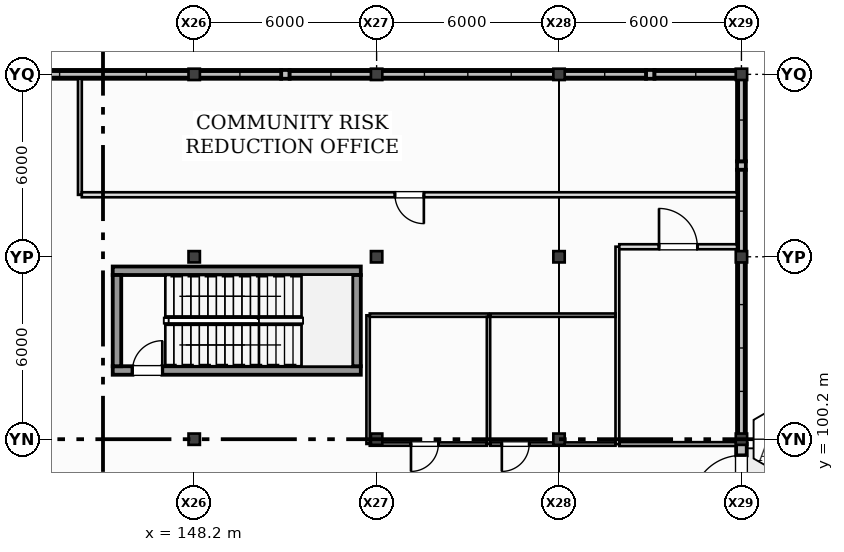
"""IFC4 building model, lengths in metres.
Left out: names, types, materials, properties, quantities, classifications, styles, units other than length and angle.
Written with IfcOpenShell. Run it as: python <this file> out.ifc"""

import sys

from ifc_helpers import new_model, si_unit, direction, frame, frame_2d, origin, origin_2d, place, context, subcontext, project, spatial, rectangle, i_section, extrude, element, fill, save


model = new_model("IFC4")
c1 = context("Model", 3, precision=1e-05, world=origin(), true_north=direction((0.0, 1.0)))
c2 = subcontext(c1, "Body", "Model", "MODEL_VIEW")
j1 = project(units=[si_unit("LENGTHUNIT", "METRE"), si_unit("PLANEANGLEUNIT", "RADIAN")], contexts=[c1])
p1 = place(None, origin())
s1 = spatial("IfcSite", under=j1, at=p1, CompositionType="ELEMENT")
p2 = place(p1, origin())
s2 = spatial("IfcBuilding", under=s1, at=p2, CompositionType="ELEMENT")
p3 = place(p2, origin())
s3 = spatial("IfcBuildingStorey", under=s2, at=p3, CompositionType="ELEMENT", Elevation=0.0)
for number, where, z_axis, x_axis in (
    (1, (148.2, 100.2, 0.0), (0.0, 0.0, 1.0), (1.0, 0.0, 0.0)),
    (2, (148.2, 106.2, 0.0), (0.0, 0.0, 1.0), (1.0, 0.0, 0.0)),
    (3, (148.2, 112.2, 0.0), (0.0, 0.0, 1.0), (1.0, 0.0, 0.0)),
    (4, (154.2, 100.2, 0.0), (0.0, 0.0, 1.0), (1.0, 0.0, 0.0)),
    (5, (154.2, 106.2, 0.0), (0.0, 0.0, 1.0), (1.0, 0.0, 0.0)),
    (6, (154.2, 112.2, 0.0), (0.0, 0.0, 1.0), (1.0, 0.0, 0.0)),
    (7, (160.2, 100.2, 0.0), (0.0, 0.0, 1.0), (1.0, 0.0, 0.0)),
    (8, (160.2, 106.2, 0.0), (0.0, 0.0, 1.0), (1.0, 0.0, 0.0)),
    (9, (160.2, 112.2, 0.0), (0.0, 0.0, 1.0), (1.0, 0.0, 0.0)),
    (10, (166.2, 100.2, 0.0), (0.0, 0.0, 1.0), (1.0, 0.0, 0.0)),
    (11, (166.2, 106.2, 0.0), (0.0, 0.0, 1.0), (1.0, 0.0, 0.0)),
    (12, (166.2, 112.2, 0.0), (0.0, 0.0, 1.0), (1.0, 0.0, 0.0)),
):
    element("IfcColumn", number, at=place(p3, frame(where, z_axis=z_axis, x_axis=x_axis)), inside=s3, PredefinedType="COLUMN", context=c2, shape_type="SweptSolid", body=[
        extrude(i_section(OverallWidth=0.374, OverallDepth=0.372, WebThickness=0.016, FlangeThickness=0.026, at=origin_2d()), origin(), (0.0, 0.0, 1.0), 6.0),
    ])
p4 = place(p3, frame((148.055, 112.2, 0.0), z_axis=(0.0, 0.0, 1.0), x_axis=(-1.0, 0.0, 0.0)))
e13 = element("IfcWall", 13, at=p4, inside=s3, PredefinedType="STANDARD", context=c2, shape_type="SweptSolid", body=[
    extrude(rectangle(XDim=5.71, YDim=0.29, at=frame_2d((2.855, 0.0))), origin(), (0.0, 0.0, 1.0), 0.56),
])
p5 = place(p3, frame((151.34, 112.2, 0.0), z_axis=(0.0, 0.0, 1.0), x_axis=(-1.0, 0.0, 0.0)))
e14 = element("IfcWall", 14, at=p5, inside=s3, PredefinedType="STANDARD", context=c2, shape_type="SweptSolid", body=[
    extrude(rectangle(XDim=0.28, YDim=0.29, at=frame_2d((0.14, 0.0))), origin(), (0.0, 0.0, 1.0), 5.113),
])
p6 = place(p3, frame((154.055, 112.2, 0.0), z_axis=(0.0, 0.0, 1.0), x_axis=(-1.0, 0.0, 0.0)))
e15 = element("IfcWall", 15, at=p6, inside=s3, PredefinedType="STANDARD", context=c2, shape_type="SweptSolid", body=[
    extrude(rectangle(XDim=2.715, YDim=0.29, at=frame_2d((1.357, 0.0))), origin(), (0.0, 0.0, 1.0), 0.68),
])
p7 = place(p3, frame((151.06, 112.2, 0.0), z_axis=(0.0, 0.0, 1.0), x_axis=(-1.0, 0.0, 0.0)))
e16 = element("IfcWall", 16, at=p7, inside=s3, PredefinedType="STANDARD", context=c2, shape_type="SweptSolid", body=[
    extrude(rectangle(XDim=2.715, YDim=0.29, at=frame_2d((1.357, 0.0))), origin(), (0.0, 0.0, 1.0), 0.8),
])
p8 = place(p3, frame((160.055, 112.2, 0.0), z_axis=(0.0, 0.0, 1.0), x_axis=(-1.0, 0.0, 0.0)))
e17 = element("IfcWall", 17, at=p8, inside=s3, PredefinedType="STANDARD", context=c2, shape_type="SweptSolid", body=[
    extrude(rectangle(XDim=5.71, YDim=0.29, at=frame_2d((2.855, 0.0))), origin(), (0.0, 0.0, 1.0), 0.92),
])
p9 = place(p3, frame((163.34, 112.2, 0.0), z_axis=(0.0, 0.0, 1.0), x_axis=(-1.0, 0.0, 0.0)))
e18 = element("IfcWall", 18, at=p9, inside=s3, PredefinedType="STANDARD", context=c2, shape_type="SweptSolid", body=[
    extrude(rectangle(XDim=0.28, YDim=0.29, at=frame_2d((0.14, 0.0))), origin(), (0.0, 0.0, 1.0), 5.113),
])
p10 = place(p3, frame((166.055, 112.2, 0.0), z_axis=(0.0, 0.0, 1.0), x_axis=(-1.0, 0.0, 0.0)))
e19 = element("IfcWall", 19, at=p10, inside=s3, PredefinedType="STANDARD", context=c2, shape_type="SweptSolid", body=[
    extrude(rectangle(XDim=2.715, YDim=0.29, at=frame_2d((1.357, 0.0))), origin(), (0.0, 0.0, 1.0), 0.32),
])
p11 = place(p3, frame((163.06, 112.2, 0.0), z_axis=(0.0, 0.0, 1.0), x_axis=(-1.0, 0.0, 0.0)))
e20 = element("IfcWall", 20, at=p11, inside=s3, PredefinedType="STANDARD", context=c2, shape_type="SweptSolid", body=[
    extrude(rectangle(XDim=2.715, YDim=0.29, at=frame_2d((1.357, 0.0))), origin(), (0.0, 0.0, 1.0), 0.44),
])
p12 = place(p3, frame((166.2, 94.345, 0.0), z_axis=(0.0, 0.0, 1.0), x_axis=(0.0, 1.0, 0.0)))
e21 = element("IfcWall", 21, at=p12, inside=s3, PredefinedType="STANDARD", context=c2, shape_type="SweptSolid", body=[
    extrude(rectangle(XDim=5.71, YDim=0.35, at=frame_2d((2.855, 0.0))), origin(), (0.0, 0.0, 1.0), 5.044),
])
p13 = place(p12, frame((3.704, 0.0, 0.0)))
e22 = element("IfcOpeningElement", 22, at=p13, cuts=e21, PredefinedType="OPENING", context=c2, shape_type="SweptSolid", body=[
    extrude(rectangle(XDim=1.62, YDim=2.2, at=frame_2d((0.81, 1.1))), frame((0.0, 0.185, 0.0), z_axis=(0.0, -1.0, 0.0), x_axis=(1.0, 0.0, 0.0)), (0.0, 0.0, 1.0), 0.37),
])
p14 = place(p3, frame((166.2, 100.345, 0.0), z_axis=(0.0, 0.0, 1.0), x_axis=(0.0, 1.0, 0.0)))
e23 = element("IfcWall", 23, at=p14, inside=s3, PredefinedType="STANDARD", context=c2, shape_type="SweptSolid", body=[
    extrude(rectangle(XDim=5.71, YDim=0.29, at=frame_2d((2.855, 0.0))), origin(), (0.0, 0.0, 1.0), 0.32),
])
p15 = place(p3, frame((166.2, 109.06, 0.0), z_axis=(0.0, 0.0, 1.0), x_axis=(0.0, 1.0, 0.0)))
e24 = element("IfcWall", 24, at=p15, inside=s3, PredefinedType="STANDARD", context=c2, shape_type="SweptSolid", body=[
    extrude(rectangle(XDim=0.28, YDim=0.29, at=frame_2d((0.14, 0.0))), origin(), (0.0, 0.0, 1.0), 5.044),
])
p16 = place(p3, frame((166.2, 106.345, 0.0), z_axis=(0.0, 0.0, 1.0), x_axis=(0.0, 1.0, 0.0)))
e25 = element("IfcWall", 25, at=p16, inside=s3, PredefinedType="STANDARD", context=c2, shape_type="SweptSolid", body=[
    extrude(rectangle(XDim=2.715, YDim=0.29, at=frame_2d((1.357, 0.0))), origin(), (0.0, 0.0, 1.0), 0.44),
])
p17 = place(p3, frame((166.2, 109.34, 0.0), z_axis=(0.0, 0.0, 1.0), x_axis=(0.0, 1.0, 0.0)))
e26 = element("IfcWall", 26, at=p17, inside=s3, PredefinedType="STANDARD", context=c2, shape_type="SweptSolid", body=[
    extrude(rectangle(XDim=2.715, YDim=0.29, at=frame_2d((1.357, 0.0))), origin(), (0.0, 0.0, 1.0), 0.56),
])
p18 = place(p3, frame((145.52, 102.46, 0.0), z_axis=(0.0, 0.0, 1.0), x_axis=(1.0, 0.0, 0.0)))
e27 = element("IfcWall", 27, at=p18, inside=s3, PredefinedType="SHEAR", context=c2, shape_type="SweptSolid", body=[
    extrude(rectangle(XDim=8.16, YDim=0.28, at=frame_2d((4.08, 0.0))), origin(), (0.0, 0.0, 1.0), 6.0),
])
p19 = place(p18, frame((0.65, 0.0, 0.0)))
e28 = element("IfcOpeningElement", 28, at=p19, cuts=e27, PredefinedType="OPENING", context=c2, shape_type="SweptSolid", body=[
    extrude(rectangle(XDim=0.98, YDim=2.15, at=frame_2d((0.49, 1.075))), frame((0.0, 0.15, 0.0), z_axis=(0.0, -1.0, 0.0), x_axis=(1.0, 0.0, 0.0)), (0.0, 0.0, 1.0), 0.3),
])
p20 = place(p3, frame((153.68, 105.74, 0.0), z_axis=(0.0, 0.0, 1.0), x_axis=(-1.0, 0.0, 0.0)))
e29 = element("IfcWall", 29, at=p20, inside=s3, PredefinedType="SHEAR", context=c2, shape_type="SweptSolid", body=[
    extrude(rectangle(XDim=8.16, YDim=0.28, at=frame_2d((4.08, 0.0))), origin(), (0.0, 0.0, 1.0), 6.0),
])
for number, where, z_axis, x_axis in (
    (30, (145.66, 105.6, 0.0), (0.0, 0.0, 1.0), (0.0, -1.0, 0.0)),
    (31, (153.54, 102.6, 0.0), (0.0, 0.0, 1.0), (0.0, 1.0, 0.0)),
):
    element("IfcWall", number, at=place(p3, frame(where, z_axis=z_axis, x_axis=x_axis)), inside=s3, PredefinedType="SHEAR", context=c2, shape_type="SweptSolid", body=[
        extrude(rectangle(XDim=3.0, YDim=0.28, at=frame_2d((1.5, 0.0))), origin(), (0.0, 0.0, 1.0), 6.0),
    ])
p21 = place(p3, frame((144.44, 108.238, 0.0), z_axis=(0.0, 0.0, 1.0), x_axis=(0.0, 1.0, 0.0)))
e32 = element("IfcWall", 32, at=p21, inside=s3, PredefinedType="PARTITIONING", context=c2, shape_type="SweptSolid", body=[
    extrude(rectangle(XDim=3.817, YDim=0.125, at=frame_2d((1.909, 0.0))), origin(), (0.0, 0.0, 1.0), 5.339),
])
p22 = place(p3, frame((166.055, 108.24, 0.0), z_axis=(0.0, 0.0, 1.0), x_axis=(-1.0, 0.0, 0.0)))
e33 = element("IfcWall", 33, at=p22, inside=s3, PredefinedType="PARTITIONING", context=c2, shape_type="SweptSolid", body=[
    extrude(rectangle(XDim=21.552, YDim=0.165, at=frame_2d((10.776, 0.0))), origin(), (0.0, 0.0, 1.0), 5.68),
])
p23 = place(p22, frame((10.301, 0.0, 0.0)))
e34 = element("IfcOpeningElement", 34, at=p23, cuts=e33, PredefinedType="OPENING", context=c2, shape_type="SweptSolid", body=[
    extrude(rectangle(XDim=0.95, YDim=2.12, at=frame_2d((0.475, 1.06))), frame((0.0, 0.093, 0.0), z_axis=(0.0, -1.0, 0.0), x_axis=(1.0, 0.0, 0.0)), (0.0, 0.0, 1.0), 0.185),
])
p24 = place(p3, frame((153.92, 100.045, 0.0), z_axis=(0.0, 0.0, 1.0), x_axis=(0.0, 1.0, 0.0)))
e35 = element("IfcWall", 35, at=p24, inside=s3, PredefinedType="PARTITIONING", context=c2, shape_type="SweptSolid", body=[
    extrude(rectangle(XDim=4.23, YDim=0.11, at=frame_2d((2.115, 0.0))), origin(), (0.0, 0.0, 1.0), 5.044),
])
p25 = place(p3, frame((153.975, 104.28, 0.0), z_axis=(0.0, 0.0, 1.0), x_axis=(1.0, 0.0, 0.0)))
e36 = element("IfcWall", 36, at=p25, inside=s3, PredefinedType="PARTITIONING", context=c2, shape_type="SweptSolid", body=[
    extrude(rectangle(XDim=3.9, YDim=0.11, at=frame_2d((1.95, 0.0))), origin(), (0.0, 0.0, 1.0), 5.68),
])
p26 = place(p3, frame((157.88, 104.225, 0.0), z_axis=(0.0, 0.0, 1.0), x_axis=(0.0, -1.0, 0.0)))
e37 = element("IfcWall", 37, at=p26, inside=s3, PredefinedType="PARTITIONING", context=c2, shape_type="SweptSolid", body=[
    extrude(rectangle(XDim=4.18, YDim=0.11, at=frame_2d((2.09, 0.0))), origin(), (0.0, 0.0, 1.0), 5.39),
])
p27 = place(p3, frame((157.825, 100.04, 0.0), z_axis=(0.0, 0.0, 1.0), x_axis=(-1.0, 0.0, 0.0)))
e38 = element("IfcWall", 38, at=p27, inside=s3, PredefinedType="PARTITIONING", context=c2, shape_type="SweptSolid", body=[
    extrude(rectangle(XDim=3.85, YDim=0.11, at=frame_2d((1.925, 0.0))), origin(), (0.0, 0.0, 1.0), 5.113),
])
p28 = place(p27, frame((1.594, 0.0, 0.0)))
e39 = element("IfcOpeningElement", 39, at=p28, cuts=e38, PredefinedType="OPENING", context=c2, shape_type="SweptSolid", body=[
    extrude(rectangle(XDim=0.9, YDim=2.1, at=frame_2d((0.45, 1.05))), frame((0.0, 0.065, 0.0), z_axis=(0.0, -1.0, 0.0), x_axis=(1.0, 0.0, 0.0)), (0.0, 0.0, 1.0), 0.13),
])
p29 = place(p3, frame((162.12, 100.038, 0.0), z_axis=(0.0, 0.0, 1.0), x_axis=(0.0, 1.0, 0.0)))
e40 = element("IfcWall", 40, at=p29, inside=s3, PredefinedType="PARTITIONING", context=c2, shape_type="SweptSolid", body=[
    extrude(rectangle(XDim=6.495, YDim=0.125, at=frame_2d((3.248, 0.0))), origin(), (0.0, 0.0, 1.0), 5.451),
])
p30 = place(p3, frame((162.183, 106.53, 0.0), z_axis=(0.0, 0.0, 1.0), x_axis=(1.0, 0.0, 0.0)))
e41 = element("IfcWall", 41, at=p30, inside=s3, PredefinedType="PARTITIONING", context=c2, shape_type="SweptSolid", body=[
    extrude(rectangle(XDim=3.872, YDim=0.165, at=frame_2d((1.936, 0.0))), origin(), (0.0, 0.0, 1.0), 5.113),
])
p31 = place(p30, frame((1.306, 0.0, 0.0)))
e42 = element("IfcOpeningElement", 42, at=p31, cuts=e41, PredefinedType="OPENING", context=c2, shape_type="SweptSolid", body=[
    extrude(rectangle(XDim=1.26, YDim=2.2, at=frame_2d((0.63, 1.1))), frame((0.0, 0.093, 0.0), z_axis=(0.0, -1.0, 0.0), x_axis=(1.0, 0.0, 0.0)), (0.0, 0.0, 1.0), 0.185),
])
p32 = place(p3, frame((166.025, 100.04, 0.0), z_axis=(0.0, 0.0, 1.0), x_axis=(-1.0, 0.0, 0.0)))
e43 = element("IfcWall", 43, at=p32, inside=s3, PredefinedType="PARTITIONING", context=c2, shape_type="SweptSolid", body=[
    extrude(rectangle(XDim=3.842, YDim=0.125, at=frame_2d((1.921, 0.0))), origin(), (0.0, 0.0, 1.0), 5.113),
])
p33 = place(p3, frame((157.935, 104.28, 0.0), z_axis=(0.0, 0.0, 1.0), x_axis=(1.0, 0.0, 0.0)))
e44 = element("IfcWall", 44, at=p33, inside=s3, PredefinedType="PARTITIONING", context=c2, shape_type="SweptSolid", body=[
    extrude(rectangle(XDim=4.123, YDim=0.11, at=frame_2d((2.061, 0.0))), origin(), (0.0, 0.0, 1.0), 5.68),
])
p34 = place(p3, frame((162.058, 100.04, 0.0), z_axis=(0.0, 0.0, 1.0), x_axis=(-1.0, 0.0, 0.0)))
e45 = element("IfcWall", 45, at=p34, inside=s3, PredefinedType="PARTITIONING", context=c2, shape_type="SweptSolid", body=[
    extrude(rectangle(XDim=4.123, YDim=0.11, at=frame_2d((2.061, 0.0))), origin(), (0.0, 0.0, 1.0), 5.113),
])
p35 = place(p34, frame((2.839, 0.0, 0.0)))
e46 = element("IfcOpeningElement", 46, at=p35, cuts=e45, PredefinedType="OPENING", context=c2, shape_type="SweptSolid", body=[
    extrude(rectangle(XDim=0.9, YDim=2.1, at=frame_2d((0.45, 1.05))), frame((0.0, 0.065, 0.0), z_axis=(0.0, -1.0, 0.0), x_axis=(1.0, 0.0, 0.0)), (0.0, 0.0, 1.0), 0.13),
])
p36 = place(p13, frame((1.62, 0.0, 0.0), z_axis=(0.0, 0.0, 1.0), x_axis=(-1.0, 0.0, 0.0)))
e47 = element("IfcDoor", 47, at=p36, inside=s3, OperationType="SINGLE_SWING_LEFT", PredefinedType="DOOR", context=c2, shape_type="SweptSolid", body=[
    extrude(rectangle(XDim=1.62, YDim=2.2, at=frame_2d((0.81, 1.1))), frame((0.0, 0.025, 0.0), z_axis=(0.0, -1.0, 0.0), x_axis=(1.0, 0.0, 0.0)), (0.0, 0.0, 1.0), 0.05),
])
fill(e22, e47)
p37 = place(p19, origin())
e48 = element("IfcDoor", 48, at=p37, inside=s3, OperationType="SINGLE_SWING_RIGHT", PredefinedType="DOOR", context=c2, shape_type="SweptSolid", body=[
    extrude(rectangle(XDim=0.98, YDim=2.15, at=frame_2d((0.49, 1.075))), frame((0.0, 0.025, 0.0), z_axis=(0.0, -1.0, 0.0), x_axis=(1.0, 0.0, 0.0)), (0.0, 0.0, 1.0), 0.05),
])
fill(e28, e48)
p38 = place(p23, frame((0.95, 0.0, 0.0), z_axis=(0.0, 0.0, 1.0), x_axis=(-1.0, 0.0, 0.0)))
e49 = element("IfcDoor", 49, at=p38, inside=s3, OperationType="SINGLE_SWING_LEFT", PredefinedType="DOOR", context=c2, shape_type="SweptSolid", body=[
    extrude(rectangle(XDim=0.95, YDim=2.12, at=frame_2d((0.475, 1.06))), frame((0.0, 0.025, 0.0), z_axis=(0.0, -1.0, 0.0), x_axis=(1.0, 0.0, 0.0)), (0.0, 0.0, 1.0), 0.05),
])
fill(e34, e49)
p39 = place(p28, frame((0.9, 0.0, 0.0), z_axis=(0.0, 0.0, 1.0), x_axis=(-1.0, 0.0, 0.0)))
e50 = element("IfcDoor", 50, at=p39, inside=s3, OperationType="SINGLE_SWING_RIGHT", PredefinedType="DOOR", context=c2, shape_type="SweptSolid", body=[
    extrude(rectangle(XDim=0.9, YDim=2.1, at=frame_2d((0.45, 1.05))), frame((0.0, 0.025, 0.0), z_axis=(0.0, -1.0, 0.0), x_axis=(1.0, 0.0, 0.0)), (0.0, 0.0, 1.0), 0.05),
])
fill(e39, e50)
p40 = place(p31, frame((1.26, 0.0, 0.0), z_axis=(0.0, 0.0, 1.0), x_axis=(-1.0, 0.0, 0.0)))
e51 = element("IfcDoor", 51, at=p40, inside=s3, OperationType="SINGLE_SWING_LEFT", PredefinedType="DOOR", context=c2, shape_type="SweptSolid", body=[
    extrude(rectangle(XDim=1.26, YDim=2.2, at=frame_2d((0.63, 1.1))), frame((0.0, 0.025, 0.0), z_axis=(0.0, -1.0, 0.0), x_axis=(1.0, 0.0, 0.0)), (0.0, 0.0, 1.0), 0.05),
])
fill(e42, e51)
p41 = place(p35, frame((0.9, 0.0, 0.0), z_axis=(0.0, 0.0, 1.0), x_axis=(-1.0, 0.0, 0.0)))
e52 = element("IfcDoor", 52, at=p41, inside=s3, OperationType="SINGLE_SWING_RIGHT", PredefinedType="DOOR", context=c2, shape_type="SweptSolid", body=[
    extrude(rectangle(XDim=0.9, YDim=2.1, at=frame_2d((0.45, 1.05))), frame((0.0, 0.025, 0.0), z_axis=(0.0, -1.0, 0.0), x_axis=(1.0, 0.0, 0.0)), (0.0, 0.0, 1.0), 0.05),
])
fill(e46, e52)
save(model, sys.argv[1])
